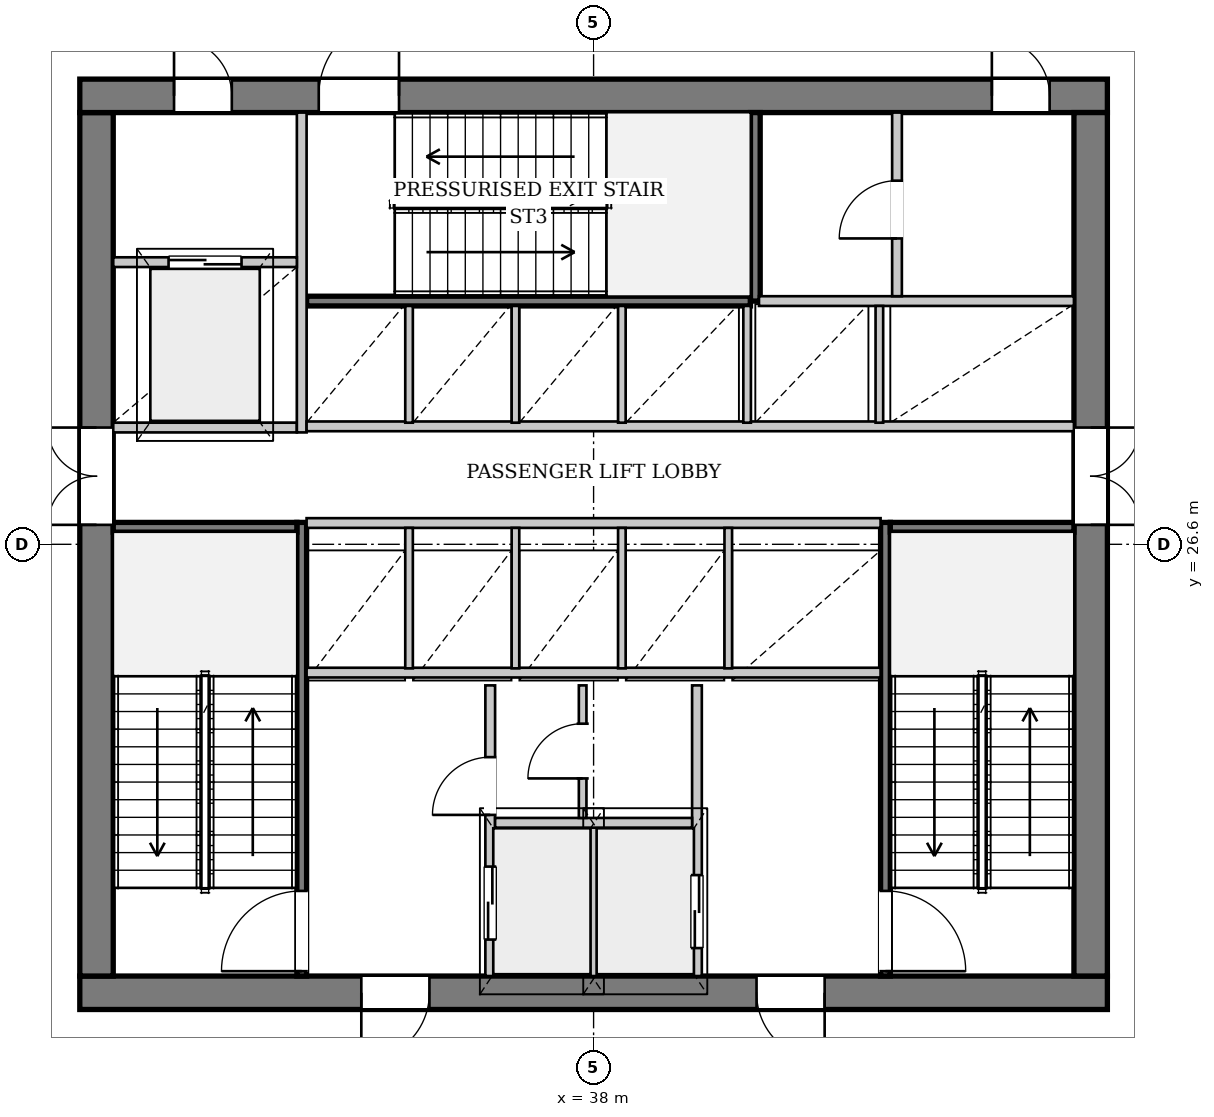
"""IFC4 building model, lengths in metres.
Left out: names, types, materials, properties, quantities, classifications, styles, units other than length and angle.
Written with IfcOpenShell. Run it as: python <this file> out.ifc"""

import sys

from ifc_helpers import new_model, si_unit, direction, frame, frame_2d, origin, place, context, subcontext, project, spatial, rectangle, extrude, source, transform, mapped, element, fill, save


model = new_model("IFC4")
c1 = context("Model", 3, precision=1e-05, world=origin(), true_north=direction((0.0, 1.0)))
c2 = subcontext(c1, "Body", "Model", "MODEL_VIEW")
j1 = project(units=[si_unit("LENGTHUNIT", "METRE"), si_unit("PLANEANGLEUNIT", "RADIAN")], contexts=[c1])
p1 = place(None, origin())
s1 = spatial("IfcSite", under=j1, at=p1, CompositionType="ELEMENT")
p2 = place(p1, origin())
s2 = spatial("IfcBuilding", under=s1, at=p2, CompositionType="ELEMENT")
p3 = place(p2, frame((0.0, 0.0, 142.1)))
s3 = spatial("IfcBuildingStorey", under=s2, at=p3, CompositionType="ELEMENT", Elevation=142.1)
p4 = place(p3, frame((46.45, 19.225, 0.0), z_axis=(0.0, 0.0, 1.0), x_axis=(-1.0, 0.0, 0.0)))
e1 = element("IfcWall", 1, at=p4, inside=s3, PredefinedType="SHEAR", context=c2, shape_type="SweptSolid", body=[
    extrude(rectangle(XDim=16.9, YDim=0.55, at=frame_2d((8.45, 0.0))), origin(), (0.0, 0.0, 1.0), 4.25),
])
p5 = place(p4, frame((4.65, 0.0, 0.0)))
e2 = element("IfcOpeningElement", 2, at=p5, cuts=e1, PredefinedType="OPENING", context=c2, shape_type="SweptSolid", body=[
    extrude(rectangle(XDim=1.12, YDim=2.25, at=frame_2d((0.56, 1.125))), frame((0.0, 0.285, 0.0), z_axis=(0.0, -1.0, 0.0), x_axis=(1.0, 0.0, 0.0)), (0.0, 0.0, 1.0), 0.57),
])
p6 = place(p4, frame((11.15, 0.0, 0.0)))
e3 = element("IfcOpeningElement", 3, at=p6, cuts=e1, PredefinedType="OPENING", context=c2, shape_type="SweptSolid", body=[
    extrude(rectangle(XDim=1.12, YDim=2.25, at=frame_2d((0.56, 1.125))), frame((0.0, 0.285, 0.0), z_axis=(0.0, -1.0, 0.0), x_axis=(1.0, 0.0, 0.0)), (0.0, 0.0, 1.0), 0.57),
])
p7 = place(p3, frame((29.825, 19.5, 0.0), z_axis=(0.0, 0.0, 1.0), x_axis=(0.0, 1.0, 0.0)))
e4 = element("IfcWall", 4, at=p7, inside=s3, PredefinedType="SHEAR", context=c2, shape_type="SweptSolid", body=[
    extrude(rectangle(XDim=14.2, YDim=0.55, at=frame_2d((7.1, 0.0))), origin(), (0.0, 0.0, 1.0), 4.25),
])
p8 = place(p7, frame((7.42, 0.0, 0.0)))
e5 = element("IfcOpeningElement", 5, at=p8, cuts=e4, PredefinedType="OPENING", context=c2, shape_type="SweptSolid", body=[
    extrude(rectangle(XDim=1.6, YDim=2.2, at=frame_2d((0.8, 1.1))), frame((0.0, 0.285, 0.0), z_axis=(0.0, -1.0, 0.0), x_axis=(1.0, 0.0, 0.0)), (0.0, 0.0, 1.0), 0.57),
])
p9 = place(p3, frame((29.55, 33.975, 0.0), z_axis=(0.0, 0.0, 1.0), x_axis=(1.0, 0.0, 0.0)))
e6 = element("IfcWall", 6, at=p9, inside=s3, PredefinedType="SHEAR", context=c2, shape_type="SweptSolid", body=[
    extrude(rectangle(XDim=16.9, YDim=0.55, at=frame_2d((8.45, 0.0))), origin(), (0.0, 0.0, 1.0), 4.25),
])
p10 = place(p9, frame((1.55, 0.0, 0.0)))
e7 = element("IfcOpeningElement", 7, at=p10, cuts=e6, PredefinedType="OPENING", context=c2, shape_type="SweptSolid", body=[
    extrude(rectangle(XDim=0.95, YDim=2.1, at=frame_2d((0.475, 1.05))), frame((0.0, 0.285, 0.0), z_axis=(0.0, -1.0, 0.0), x_axis=(1.0, 0.0, 0.0)), (0.0, 0.0, 1.0), 0.57),
])
p11 = place(p9, frame((3.93, 0.0, 0.0)))
e8 = element("IfcOpeningElement", 8, at=p11, cuts=e6, PredefinedType="OPENING", context=c2, shape_type="SweptSolid", body=[
    extrude(rectangle(XDim=1.32, YDim=2.2, at=frame_2d((0.66, 1.1))), frame((0.0, 0.285, 0.0), z_axis=(0.0, -1.0, 0.0), x_axis=(1.0, 0.0, 0.0)), (0.0, 0.0, 1.0), 0.57),
])
p12 = place(p9, frame((15.0, 0.0, 0.0)))
e9 = element("IfcOpeningElement", 9, at=p12, cuts=e6, PredefinedType="OPENING", context=c2, shape_type="SweptSolid", body=[
    extrude(rectangle(XDim=0.95, YDim=2.1, at=frame_2d((0.475, 1.05))), frame((0.0, 0.285, 0.0), z_axis=(0.0, -1.0, 0.0), x_axis=(1.0, 0.0, 0.0)), (0.0, 0.0, 1.0), 0.57),
])
p13 = place(p3, frame((46.175, 33.7, 0.0), z_axis=(0.0, 0.0, 1.0), x_axis=(0.0, -1.0, 0.0)))
e10 = element("IfcWall", 10, at=p13, inside=s3, PredefinedType="SHEAR", context=c2, shape_type="SweptSolid", body=[
    extrude(rectangle(XDim=14.2, YDim=0.55, at=frame_2d((7.1, 0.0))), origin(), (0.0, 0.0, 1.0), 4.25),
])
p14 = place(p13, frame((5.18, 0.0, 0.0)))
e11 = element("IfcOpeningElement", 11, at=p14, cuts=e10, PredefinedType="OPENING", context=c2, shape_type="SweptSolid", body=[
    extrude(rectangle(XDim=1.6, YDim=2.2, at=frame_2d((0.8, 1.1))), frame((0.0, 0.285, 0.0), z_axis=(0.0, -1.0, 0.0), x_axis=(1.0, 0.0, 0.0)), (0.0, 0.0, 1.0), 0.57),
])
p15 = place(p3, frame((33.2, 19.5, 0.0), z_axis=(0.0, 0.0, 1.0), x_axis=(0.0, 1.0, 0.0)))
e12 = element("IfcWall", 12, at=p15, inside=s3, PredefinedType="PARTITIONING", context=c2, shape_type="SweptSolid", body=[
    extrude(rectangle(XDim=7.46, YDim=0.16, at=frame_2d((3.73, 0.0))), origin(), (0.0, 0.0, 1.0), 4.25),
])
p16 = place(p15, frame((0.08, 0.0, 0.0)))
e13 = element("IfcOpeningElement", 13, at=p16, cuts=e12, PredefinedType="OPENING", context=c2, shape_type="SweptSolid", body=[
    extrude(rectangle(XDim=1.32, YDim=2.2, at=frame_2d((0.66, 1.1))), frame((0.0, 0.09, 0.0), z_axis=(0.0, -1.0, 0.0), x_axis=(1.0, 0.0, 0.0)), (0.0, 0.0, 1.0), 0.18),
])
p17 = place(p3, frame((30.1, 26.88, 0.0), z_axis=(0.0, 0.0, 1.0), x_axis=(1.0, 0.0, 0.0)))
e14 = element("IfcWall", 14, at=p17, inside=s3, PredefinedType="PARTITIONING", context=c2, shape_type="SweptSolid", body=[
    extrude(rectangle(XDim=3.02, YDim=0.16, at=frame_2d((1.51, 0.0))), origin(), (0.0, 0.0, 1.0), 4.25),
])
p18 = place(p3, frame((42.8, 26.96, 0.0), z_axis=(0.0, 0.0, 1.0), x_axis=(0.0, -1.0, 0.0)))
e15 = element("IfcWall", 15, at=p18, inside=s3, PredefinedType="PARTITIONING", context=c2, shape_type="SweptSolid", body=[
    extrude(rectangle(XDim=7.46, YDim=0.16, at=frame_2d((3.73, 0.0))), origin(), (0.0, 0.0, 1.0), 4.25),
])
p19 = place(p18, frame((6.06, 0.0, 0.0)))
e16 = element("IfcOpeningElement", 16, at=p19, cuts=e15, PredefinedType="OPENING", context=c2, shape_type="SweptSolid", body=[
    extrude(rectangle(XDim=1.32, YDim=2.2, at=frame_2d((0.66, 1.1))), frame((0.0, 0.09, 0.0), z_axis=(0.0, -1.0, 0.0), x_axis=(1.0, 0.0, 0.0)), (0.0, 0.0, 1.0), 0.18),
])
p20 = place(p3, frame((42.88, 26.88, 0.0), z_axis=(0.0, 0.0, 1.0), x_axis=(1.0, 0.0, 0.0)))
e17 = element("IfcWall", 17, at=p20, inside=s3, PredefinedType="PARTITIONING", context=c2, shape_type="SweptSolid", body=[
    extrude(rectangle(XDim=3.02, YDim=0.16, at=frame_2d((1.51, 0.0))), origin(), (0.0, 0.0, 1.0), 4.25),
])
p21 = place(p3, frame((33.28, 30.6, 0.0), z_axis=(0.0, 0.0, 1.0), x_axis=(1.0, 0.0, 0.0)))
e18 = element("IfcWall", 18, at=p21, inside=s3, PredefinedType="PARTITIONING", context=c2, shape_type="SweptSolid", body=[
    extrude(rectangle(XDim=7.3, YDim=0.16, at=frame_2d((3.65, 0.0))), origin(), (0.0, 0.0, 1.0), 4.25),
])
p22 = place(p3, frame((40.66, 30.6, 0.0), z_axis=(0.0, 0.0, 1.0), x_axis=(0.0, 1.0, 0.0)))
e19 = element("IfcWall", 19, at=p22, inside=s3, PredefinedType="PARTITIONING", context=c2, shape_type="SweptSolid", body=[
    extrude(rectangle(XDim=3.1, YDim=0.16, at=frame_2d((1.55, 0.0))), origin(), (0.0, 0.0, 1.0), 4.25),
])
p23 = place(p3, frame((36.3, 19.5, 0.0), z_axis=(0.0, 0.0, 1.0), x_axis=(0.0, 1.0, 0.0)))
e20 = element("IfcWall", 20, at=p23, inside=s3, PredefinedType="PARTITIONING", context=c2, shape_type="SweptSolid", body=[
    extrude(rectangle(XDim=4.78, YDim=0.16, at=frame_2d((2.39, 0.0))), origin(), (0.0, 0.0, 1.0), 4.25),
])
p24 = place(p23, frame((0.6, 0.0, 0.0)))
e21 = element("IfcOpeningElement", 21, at=p24, cuts=e20, PredefinedType="OPENING", context=c2, shape_type="SweptSolid", body=[
    extrude(rectangle(XDim=1.2, YDim=2.2, at=frame_2d((0.6, 1.1))), frame((0.0, 0.09, 0.0), z_axis=(0.0, -1.0, 0.0), x_axis=(1.0, 0.0, 0.0)), (0.0, 0.0, 1.0), 0.18),
])
p25 = place(p23, frame((2.65, 0.0, 0.0)))
e22 = element("IfcOpeningElement", 22, at=p25, cuts=e20, PredefinedType="OPENING", context=c2, shape_type="SweptSolid", body=[
    extrude(rectangle(XDim=0.95, YDim=2.1, at=frame_2d((0.475, 1.05))), frame((0.0, 0.09, 0.0), z_axis=(0.0, -1.0, 0.0), x_axis=(1.0, 0.0, 0.0)), (0.0, 0.0, 1.0), 0.18),
])
p26 = place(p3, frame((39.7, 24.28, 0.0), z_axis=(0.0, 0.0, 1.0), x_axis=(0.0, -1.0, 0.0)))
e23 = element("IfcWall", 23, at=p26, inside=s3, PredefinedType="PARTITIONING", context=c2, shape_type="SweptSolid", body=[
    extrude(rectangle(XDim=4.78, YDim=0.16, at=frame_2d((2.39, 0.0))), origin(), (0.0, 0.0, 1.0), 4.25),
])
p27 = place(p26, frame((3.12, 0.0, 0.0)))
e24 = element("IfcOpeningElement", 24, at=p27, cuts=e23, PredefinedType="OPENING", context=c2, shape_type="SweptSolid", body=[
    extrude(rectangle(XDim=1.2, YDim=2.2, at=frame_2d((0.6, 1.1))), frame((0.0, 0.09, 0.0), z_axis=(0.0, -1.0, 0.0), x_axis=(1.0, 0.0, 0.0)), (0.0, 0.0, 1.0), 0.18),
])
p28 = place(p3, frame((38.0, 19.5, 0.0), z_axis=(0.0, 0.0, 1.0), x_axis=(0.0, 1.0, 0.0)))
e25 = element("IfcWall", 25, at=p28, inside=s3, PredefinedType="PARTITIONING", context=c2, shape_type="SweptSolid", body=[
    extrude(rectangle(XDim=2.46, YDim=0.125, at=frame_2d((1.23, 0.0))), origin(), (0.0, 0.0, 1.0), 4.25),
])
p29 = place(p3, frame((36.38, 22.02, 0.0), z_axis=(0.0, 0.0, 1.0), x_axis=(1.0, 0.0, 0.0)))
e26 = element("IfcWall", 26, at=p29, inside=s3, PredefinedType="PARTITIONING", context=c2, shape_type="SweptSolid", body=[
    extrude(rectangle(XDim=3.24, YDim=0.16, at=frame_2d((1.62, 0.0))), origin(), (0.0, 0.0, 1.0), 4.25),
])
p30 = place(p3, frame((33.28, 24.49, 0.0), z_axis=(0.0, 0.0, 1.0), x_axis=(1.0, 0.0, 0.0)))
e27 = element("IfcWall", 27, at=p30, inside=s3, PredefinedType="PARTITIONING", context=c2, shape_type="SweptSolid", body=[
    extrude(rectangle(XDim=9.44, YDim=0.16, at=frame_2d((4.72, 0.0))), origin(), (0.0, 0.0, 1.0), 4.25),
])
p31 = place(p3, frame((37.82, 22.1, 0.0), z_axis=(0.0, 0.0, 1.0), x_axis=(0.0, 1.0, 0.0)))
e28 = element("IfcWall", 28, at=p31, inside=s3, PredefinedType="PARTITIONING", context=c2, shape_type="SweptSolid", body=[
    extrude(rectangle(XDim=2.18, YDim=0.125, at=frame_2d((1.09, 0.0))), origin(), (0.0, 0.0, 1.0), 4.25),
])
p32 = place(p31, frame((0.65, 0.0, 0.0)))
e29 = element("IfcOpeningElement", 29, at=p32, cuts=e28, PredefinedType="OPENING", context=c2, shape_type="SweptSolid", body=[
    extrude(rectangle(XDim=0.9, YDim=2.1, at=frame_2d((0.45, 1.05))), frame((0.0, 0.073, 0.0), z_axis=(0.0, -1.0, 0.0), x_axis=(1.0, 0.0, 0.0)), (0.0, 0.0, 1.0), 0.145),
])
p33 = place(p3, frame((30.1, 28.52, 0.0), z_axis=(0.0, 0.0, 1.0), x_axis=(1.0, 0.0, 0.0)))
e30 = element("IfcWall", 30, at=p33, inside=s3, PredefinedType="PARTITIONING", context=c2, shape_type="SweptSolid", body=[
    extrude(rectangle(XDim=3.02, YDim=0.16, at=frame_2d((1.51, 0.0))), origin(), (0.0, 0.0, 1.0), 4.25),
])
p34 = place(p3, frame((33.2, 28.44, 0.0), z_axis=(0.0, 0.0, 1.0), x_axis=(0.0, 1.0, 0.0)))
e31 = element("IfcWall", 31, at=p34, inside=s3, PredefinedType="PARTITIONING", context=c2, shape_type="SweptSolid", body=[
    extrude(rectangle(XDim=5.26, YDim=0.16, at=frame_2d((2.63, 0.0))), origin(), (0.0, 0.0, 1.0), 4.25),
])
p35 = place(p3, frame((30.1, 31.24, 0.0), z_axis=(0.0, 0.0, 1.0), x_axis=(1.0, 0.0, 0.0)))
e32 = element("IfcWall", 32, at=p35, inside=s3, PredefinedType="PARTITIONING", context=c2, shape_type="SweptSolid", body=[
    extrude(rectangle(XDim=3.02, YDim=0.16, at=frame_2d((1.51, 0.0))), origin(), (0.0, 0.0, 1.0), 4.25),
])
p36 = place(p35, frame((0.91, 0.0, 0.0)))
e33 = element("IfcOpeningElement", 33, at=p36, cuts=e32, PredefinedType="OPENING", context=c2, shape_type="SweptSolid", body=[
    extrude(rectangle(XDim=1.2, YDim=2.2, at=frame_2d((0.6, 1.1))), frame((0.0, 0.09, 0.0), z_axis=(0.0, -1.0, 0.0), x_axis=(1.0, 0.0, 0.0)), (0.0, 0.0, 1.0), 0.18),
])
p37 = place(p3, frame((33.28, 26.95, 0.0), z_axis=(0.0, 0.0, 1.0), x_axis=(1.0, 0.0, 0.0)))
e34 = element("IfcWall", 34, at=p37, inside=s3, PredefinedType="PARTITIONING", context=c2, shape_type="SweptSolid", body=[
    extrude(rectangle(XDim=9.44, YDim=0.16, at=frame_2d((4.72, 0.0))), origin(), (0.0, 0.0, 1.0), 4.25),
])
for number, where, z_axis, x_axis in (
    (35, (34.965, 24.56, 0.0), (0.0, 0.0, 1.0), (0.0, 1.0, 0.0)),
    (36, (36.715, 24.56, 0.0), (0.0, 0.0, 1.0), (0.0, 1.0, 0.0)),
    (37, (38.465, 24.56, 0.0), (0.0, 0.0, 1.0), (0.0, 1.0, 0.0)),
    (38, (40.215, 24.56, 0.0), (0.0, 0.0, 1.0), (0.0, 1.0, 0.0)),
):
    element("IfcWall", number, at=place(p3, frame(where, z_axis=z_axis, x_axis=x_axis)), inside=s3, PredefinedType="PARTITIONING", context=c2, shape_type="SweptSolid", body=[
        extrude(rectangle(XDim=2.31, YDim=0.125, at=frame_2d((1.155, 0.0))), origin(), (0.0, 0.0, 1.0), 4.25),
    ])
p38 = place(p3, frame((33.28, 28.54, 0.0), z_axis=(0.0, 0.0, 1.0), x_axis=(1.0, 0.0, 0.0)))
e39 = element("IfcWall", 39, at=p38, inside=s3, PredefinedType="PARTITIONING", context=c2, shape_type="SweptSolid", body=[
    extrude(rectangle(XDim=12.62, YDim=0.16, at=frame_2d((6.31, 0.0))), origin(), (0.0, 0.0, 1.0), 4.25),
])
p39 = place(p3, frame((40.72, 30.6, 0.0), z_axis=(0.0, 0.0, 1.0), x_axis=(1.0, 0.0, 0.0)))
e40 = element("IfcWall", 40, at=p39, inside=s3, PredefinedType="PARTITIONING", context=c2, shape_type="SweptSolid", body=[
    extrude(rectangle(XDim=5.18, YDim=0.16, at=frame_2d((2.59, 0.0))), origin(), (0.0, 0.0, 1.0), 4.25),
])
for number, where, z_axis, x_axis in (
    (41, (34.965, 28.6, 0.0), (0.0, 0.0, 1.0), (0.0, 1.0, 0.0)),
    (42, (36.715, 28.6, 0.0), (0.0, 0.0, 1.0), (0.0, 1.0, 0.0)),
    (43, (38.465, 28.6, 0.0), (0.0, 0.0, 1.0), (0.0, 1.0, 0.0)),
    (44, (40.525, 28.6, 0.0), (0.0, 0.0, 1.0), (0.0, 1.0, 0.0)),
    (45, (42.7, 28.6, 0.0), (0.0, 0.0, 1.0), (0.0, 1.0, 0.0)),
):
    element("IfcWall", number, at=place(p3, frame(where, z_axis=z_axis, x_axis=x_axis)), inside=s3, PredefinedType="PARTITIONING", context=c2, shape_type="SweptSolid", body=[
        extrude(rectangle(XDim=1.92, YDim=0.125, at=frame_2d((0.96, 0.0))), origin(), (0.0, 0.0, 1.0), 4.25),
    ])
p40 = place(p3, frame((42.99, 30.68, 0.0), z_axis=(0.0, 0.0, 1.0), x_axis=(0.0, 1.0, 0.0)))
e46 = element("IfcWall", 46, at=p40, inside=s3, PredefinedType="PARTITIONING", context=c2, shape_type="SweptSolid", body=[
    extrude(rectangle(XDim=3.02, YDim=0.16, at=frame_2d((1.51, 0.0))), origin(), (0.0, 0.0, 1.0), 4.25),
])
p41 = place(p40, frame((0.95, 0.0, 0.0)))
e47 = element("IfcOpeningElement", 47, at=p41, cuts=e46, PredefinedType="OPENING", context=c2, shape_type="SweptSolid", body=[
    extrude(rectangle(XDim=0.95, YDim=2.1, at=frame_2d((0.475, 1.05))), frame((0.0, 0.09, 0.0), z_axis=(0.0, -1.0, 0.0), x_axis=(1.0, 0.0, 0.0)), (0.0, 0.0, 1.0), 0.18),
])
m1 = source(origin(), c2, "Body", "SweptSolid", [
    extrude(rectangle(XDim=1.12, YDim=2.25, at=frame_2d((0.56, 1.125))), frame((0.0, 0.025, 0.0), z_axis=(0.0, -1.0, 0.0), x_axis=(1.0, 0.0, 0.0)), (0.0, 0.0, 1.0), 0.05),
])
p42 = place(p5, origin())
e48 = element("IfcDoor", 48, at=p42, inside=s3, OperationType="SINGLE_SWING_LEFT", PredefinedType="DOOR", context=c2, shape_type="MappedRepresentation", body=[
    mapped(m1, transform((0.0, 0.0, 0.0), x_axis=(1.0, 0.0, 0.0), y_axis=(0.0, 1.0, 0.0), z_axis=(0.0, 0.0, 1.0), scale=1.0)),
])
fill(e2, e48)
p43 = place(p6, origin())
e49 = element("IfcDoor", 49, at=p43, inside=s3, OperationType="SINGLE_SWING_RIGHT", PredefinedType="DOOR", context=c2, shape_type="MappedRepresentation", body=[
    mapped(m1, transform((0.0, 0.0, 0.0), x_axis=(1.0, 0.0, 0.0), y_axis=(0.0, 1.0, 0.0), z_axis=(0.0, 0.0, 1.0), scale=1.0)),
])
fill(e3, e49)
m2 = source(origin(), c2, "Body", "SweptSolid", [
    extrude(rectangle(XDim=1.6, YDim=2.2, at=frame_2d((0.8, 1.1))), frame((0.0, 0.025, 0.0), z_axis=(0.0, -1.0, 0.0), x_axis=(1.0, 0.0, 0.0)), (0.0, 0.0, 1.0), 0.05),
])
p44 = place(p8, origin())
e50 = element("IfcDoor", 50, at=p44, inside=s3, OperationType="DOUBLE_DOOR_SINGLE_SWING", PredefinedType="DOOR", context=c2, shape_type="MappedRepresentation", body=[
    mapped(m2, transform((0.0, 0.0, 0.0), x_axis=(1.0, 0.0, 0.0), y_axis=(0.0, 1.0, 0.0), z_axis=(0.0, 0.0, 1.0), scale=1.0)),
])
fill(e5, e50)
m3 = source(origin(), c2, "Body", "SweptSolid", [
    extrude(rectangle(XDim=0.95, YDim=2.1, at=frame_2d((0.475, 1.05))), frame((0.0, 0.025, 0.0), z_axis=(0.0, -1.0, 0.0), x_axis=(1.0, 0.0, 0.0)), (0.0, 0.0, 1.0), 0.05),
])
p45 = place(p10, origin())
e51 = element("IfcDoor", 51, at=p45, inside=s3, OperationType="SINGLE_SWING_LEFT", PredefinedType="DOOR", context=c2, shape_type="MappedRepresentation", body=[
    mapped(m3, transform((0.0, 0.0, 0.0), x_axis=(1.0, 0.0, 0.0), y_axis=(0.0, 1.0, 0.0), z_axis=(0.0, 0.0, 1.0), scale=1.0)),
])
fill(e7, e51)
m4 = source(origin(), c2, "Body", "SweptSolid", [
    extrude(rectangle(XDim=1.32, YDim=2.2, at=frame_2d((0.66, 1.1))), frame((0.0, 0.025, 0.0), z_axis=(0.0, -1.0, 0.0), x_axis=(1.0, 0.0, 0.0)), (0.0, 0.0, 1.0), 0.05),
])
p46 = place(p11, origin())
e52 = element("IfcDoor", 52, at=p46, inside=s3, OperationType="SINGLE_SWING_RIGHT", PredefinedType="DOOR", context=c2, shape_type="MappedRepresentation", body=[
    mapped(m4, transform((0.0, 0.0, 0.0), x_axis=(1.0, 0.0, 0.0), y_axis=(0.0, 1.0, 0.0), z_axis=(0.0, 0.0, 1.0), scale=1.0)),
])
fill(e8, e52)
p47 = place(p14, origin())
e53 = element("IfcDoor", 53, at=p47, inside=s3, OperationType="DOUBLE_DOOR_SINGLE_SWING", PredefinedType="DOOR", context=c2, shape_type="MappedRepresentation", body=[
    mapped(m2, transform((0.0, 0.0, 0.0), x_axis=(1.0, 0.0, 0.0), y_axis=(0.0, 1.0, 0.0), z_axis=(0.0, 0.0, 1.0), scale=1.0)),
])
fill(e11, e53)
p48 = place(p16, origin())
e54 = element("IfcDoor", 54, at=p48, inside=s3, OperationType="SINGLE_SWING_LEFT", PredefinedType="DOOR", context=c2, shape_type="MappedRepresentation", body=[
    mapped(m4, transform((0.0, 0.0, 0.0), x_axis=(1.0, 0.0, 0.0), y_axis=(0.0, 1.0, 0.0), z_axis=(0.0, 0.0, 1.0), scale=1.0)),
])
fill(e13, e54)
p49 = place(p19, origin())
e55 = element("IfcDoor", 55, at=p49, inside=s3, OperationType="SINGLE_SWING_RIGHT", PredefinedType="DOOR", context=c2, shape_type="MappedRepresentation", body=[
    mapped(m4, transform((0.0, 0.0, 0.0), x_axis=(1.0, 0.0, 0.0), y_axis=(0.0, 1.0, 0.0), z_axis=(0.0, 0.0, 1.0), scale=1.0)),
])
fill(e16, e55)
m5 = source(origin(), c2, "Body", "SweptSolid", [
    extrude(rectangle(XDim=1.2, YDim=2.2, at=frame_2d((0.6, 1.1))), frame((0.0, 0.025, 0.0), z_axis=(0.0, -1.0, 0.0), x_axis=(1.0, 0.0, 0.0)), (0.0, 0.0, 1.0), 0.05),
])
p50 = place(p24, origin())
e56 = element("IfcDoor", 56, at=p50, inside=s3, OperationType="DOUBLE_DOOR_SLIDING", PredefinedType="DOOR", context=c2, shape_type="MappedRepresentation", body=[
    mapped(m5, transform((0.0, 0.0, 0.0), x_axis=(1.0, 0.0, 0.0), y_axis=(0.0, 1.0, 0.0), z_axis=(0.0, 0.0, 1.0), scale=1.0)),
])
fill(e21, e56)
p51 = place(p25, origin())
e57 = element("IfcDoor", 57, at=p51, inside=s3, OperationType="SINGLE_SWING_LEFT", PredefinedType="DOOR", context=c2, shape_type="MappedRepresentation", body=[
    mapped(m3, transform((0.0, 0.0, 0.0), x_axis=(1.0, 0.0, 0.0), y_axis=(0.0, 1.0, 0.0), z_axis=(0.0, 0.0, 1.0), scale=1.0)),
])
fill(e22, e57)
m6 = source(origin(), c2, "Body", "SweptSolid", [
    extrude(rectangle(XDim=0.9, YDim=2.1, at=frame_2d((0.45, 1.05))), frame((0.0, 0.025, 0.0), z_axis=(0.0, -1.0, 0.0), x_axis=(1.0, 0.0, 0.0)), (0.0, 0.0, 1.0), 0.05),
])
p52 = place(p32, origin())
e58 = element("IfcDoor", 58, at=p52, inside=s3, OperationType="SINGLE_SWING_LEFT", PredefinedType="DOOR", context=c2, shape_type="MappedRepresentation", body=[
    mapped(m6, transform((0.0, 0.0, 0.0), x_axis=(1.0, 0.0, 0.0), y_axis=(0.0, 1.0, 0.0), z_axis=(0.0, 0.0, 1.0), scale=1.0)),
])
fill(e29, e58)
p53 = place(p27, origin())
e59 = element("IfcDoor", 59, at=p53, inside=s3, OperationType="DOUBLE_DOOR_SLIDING", PredefinedType="DOOR", context=c2, shape_type="MappedRepresentation", body=[
    mapped(m5, transform((0.0, 0.0, 0.0), x_axis=(1.0, 0.0, 0.0), y_axis=(0.0, 1.0, 0.0), z_axis=(0.0, 0.0, 1.0), scale=1.0)),
])
fill(e24, e59)
p54 = place(p36, origin())
e60 = element("IfcDoor", 60, at=p54, inside=s3, OperationType="DOUBLE_DOOR_SLIDING", PredefinedType="DOOR", context=c2, shape_type="MappedRepresentation", body=[
    mapped(m5, transform((0.0, 0.0, 0.0), x_axis=(1.0, 0.0, 0.0), y_axis=(0.0, 1.0, 0.0), z_axis=(0.0, 0.0, 1.0), scale=1.0)),
])
fill(e33, e60)
p55 = place(p41, origin())
e61 = element("IfcDoor", 61, at=p55, inside=s3, OperationType="SINGLE_SWING_LEFT", PredefinedType="DOOR", context=c2, shape_type="MappedRepresentation", body=[
    mapped(m3, transform((0.0, 0.0, 0.0), x_axis=(1.0, 0.0, 0.0), y_axis=(0.0, 1.0, 0.0), z_axis=(0.0, 0.0, 1.0), scale=1.0)),
])
fill(e47, e61)
p56 = place(p12, origin())
e62 = element("IfcDoor", 62, at=p56, inside=s3, OperationType="SINGLE_SWING_LEFT", PredefinedType="DOOR", context=c2, shape_type="MappedRepresentation", body=[
    mapped(m3, transform((0.0, 0.0, 0.0), x_axis=(1.0, 0.0, 0.0), y_axis=(0.0, 1.0, 0.0), z_axis=(0.0, 0.0, 1.0), scale=1.0)),
])
fill(e9, e62)
save(model, sys.argv[1])
